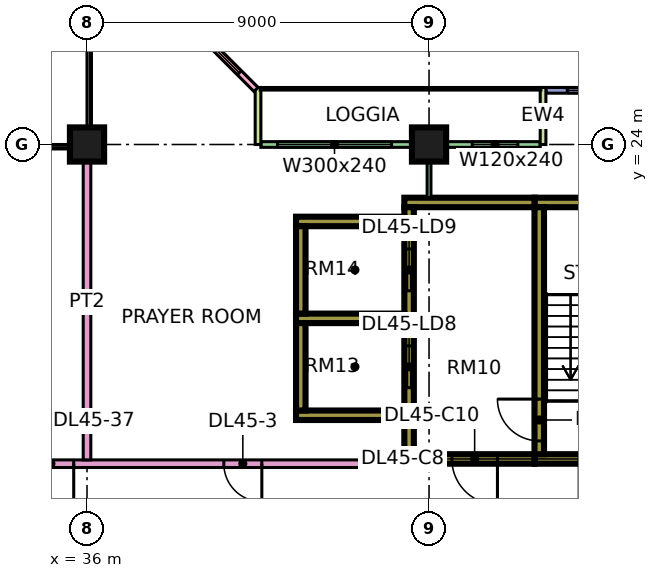
"""IFC4 building model, lengths in metres.
Left out: names, types, materials, properties, quantities, classifications, styles, units other than length and angle.
Written with IfcOpenShell. Run it as: python <this file> out.ifc"""

import sys

from ifc_helpers import new_model, si_unit, direction, frame, frame_2d, origin, origin_2d, place, context, subcontext, project, spatial, rectangle, extrude, element, fill, save


model = new_model("IFC4")
c1 = context("Model", 3, precision=1e-05, world=origin(), true_north=direction((0.0, 1.0)))
c2 = subcontext(c1, "Body", "Model", "MODEL_VIEW")
j1 = project(units=[si_unit("LENGTHUNIT", "METRE"), si_unit("PLANEANGLEUNIT", "RADIAN")], contexts=[c1])
p1 = place(None, origin())
s1 = spatial("IfcSite", under=j1, at=p1, CompositionType="ELEMENT")
p2 = place(p1, origin())
s2 = spatial("IfcBuilding", under=s1, at=p2, CompositionType="ELEMENT")
p3 = place(p2, frame((0.0, 0.0, 194.9)))
s3 = spatial("IfcBuildingStorey", under=s2, at=p3, CompositionType="ELEMENT", Elevation=194.9)
for number, where, z_axis, x_axis in (
    (1, (36.0, 24.0, 0.0), (0.0, 0.0, 1.0), (1.0, 0.0, 0.0)),
    (2, (45.0, 24.0, 0.0), (0.0, 0.0, 1.0), (1.0, 0.0, 0.0)),
):
    element("IfcColumn", number, at=place(p3, frame(where, z_axis=z_axis, x_axis=x_axis)), inside=s3, PredefinedType="COLUMN", context=c2, shape_type="SweptSolid", body=[
        extrude(rectangle(XDim=0.9, YDim=0.9, at=origin_2d()), origin(), (0.0, 0.0, 1.0), 3.75),
    ])
p4 = place(p3, frame((47.775, 15.725, 0.0), z_axis=(0.0, 0.0, 1.0), x_axis=(1.0, 0.0, 0.0)))
e3 = element("IfcWall", 3, at=p4, inside=s3, PredefinedType="SHEAR", context=c2, shape_type="SweptSolid", body=[
    extrude(rectangle(XDim=3.45, YDim=0.25, at=frame_2d((1.725, 0.0))), origin(), (0.0, 0.0, 1.0), 3.75),
])
p5 = place(p4, frame((1.175, 0.0, 0.0)))
e4 = element("IfcOpeningElement", 4, at=p5, cuts=e3, PredefinedType="OPENING", context=c2, shape_type="SweptSolid", body=[
    extrude(rectangle(XDim=1.1, YDim=2.2, at=frame_2d((0.55, 1.1))), frame((0.0, 0.135, 0.0), z_axis=(0.0, -1.0, 0.0), x_axis=(1.0, 0.0, 0.0)), (0.0, 0.0, 1.0), 0.27),
])
p6 = place(p3, frame((47.775, 22.475, 0.0), z_axis=(0.0, 0.0, 1.0), x_axis=(1.0, 0.0, 0.0)))
e5 = element("IfcWall", 5, at=p6, inside=s3, PredefinedType="SHEAR", context=c2, shape_type="SweptSolid", body=[
    extrude(rectangle(XDim=3.45, YDim=0.25, at=frame_2d((1.725, 0.0))), origin(), (0.0, 0.0, 1.0), 3.75),
])
p7 = place(p3, frame((47.9, 15.85, 0.0), z_axis=(0.0, 0.0, 1.0), x_axis=(0.0, 1.0, 0.0)))
e6 = element("IfcWall", 6, at=p7, inside=s3, PredefinedType="SHEAR", context=c2, shape_type="SweptSolid", body=[
    extrude(rectangle(XDim=6.5, YDim=0.25, at=frame_2d((3.25, 0.0))), origin(), (0.0, 0.0, 1.0), 3.75),
])
p8 = place(p7, frame((0.35, 0.0, 0.0)))
e7 = element("IfcOpeningElement", 7, at=p8, cuts=e6, PredefinedType="OPENING", context=c2, shape_type="SweptSolid", body=[
    extrude(rectangle(XDim=1.1, YDim=2.2, at=frame_2d((0.55, 1.1))), frame((0.0, 0.135, 0.0), z_axis=(0.0, -1.0, 0.0), x_axis=(1.0, 0.0, 0.0)), (0.0, 0.0, 1.0), 0.27),
])
p9 = place(p3, frame((44.35, 15.725, 0.0), z_axis=(0.0, 0.0, 1.0), x_axis=(1.0, 0.0, 0.0)))
e8 = element("IfcWall", 8, at=p9, inside=s3, PredefinedType="SHEAR", context=c2, shape_type="SweptSolid", body=[
    extrude(rectangle(XDim=3.425, YDim=0.25, at=frame_2d((1.712, 0.0))), origin(), (0.0, 0.0, 1.0), 3.75),
])
p10 = place(p9, frame((1.25, 0.0, 0.0)))
e9 = element("IfcOpeningElement", 9, at=p10, cuts=e8, PredefinedType="OPENING", context=c2, shape_type="SweptSolid", body=[
    extrude(rectangle(XDim=1.2, YDim=2.2, at=frame_2d((0.6, 1.1))), frame((0.0, 0.135, 0.0), z_axis=(0.0, -1.0, 0.0), x_axis=(1.0, 0.0, 0.0)), (0.0, 0.0, 1.0), 0.27),
])
p11 = place(p3, frame((44.35, 22.475, 0.0), z_axis=(0.0, 0.0, 1.0), x_axis=(1.0, 0.0, 0.0)))
e10 = element("IfcWall", 10, at=p11, inside=s3, PredefinedType="SHEAR", context=c2, shape_type="SweptSolid", body=[
    extrude(rectangle(XDim=3.425, YDim=0.25, at=frame_2d((1.712, 0.0))), origin(), (0.0, 0.0, 1.0), 3.75),
])
p12 = place(p3, frame((44.475, 15.85, 0.0), z_axis=(0.0, 0.0, 1.0), x_axis=(0.0, 1.0, 0.0)))
e11 = element("IfcWall", 11, at=p12, inside=s3, PredefinedType="SHEAR", context=c2, shape_type="SweptSolid", body=[
    extrude(rectangle(XDim=6.5, YDim=0.25, at=frame_2d((3.25, 0.0))), origin(), (0.0, 0.0, 1.0), 3.75),
])
p13 = place(p12, frame((1.75, 0.0, 0.0)))
e12 = element("IfcOpeningElement", 12, at=p13, cuts=e11, PredefinedType="OPENING", context=c2, shape_type="SweptSolid", body=[
    extrude(rectangle(XDim=1.1, YDim=2.2, at=frame_2d((0.55, 1.1))), frame((0.0, 0.135, 0.0), z_axis=(0.0, -1.0, 0.0), x_axis=(1.0, 0.0, 0.0)), (0.0, 0.0, 1.0), 0.27),
])
p14 = place(p12, frame((4.3, 0.0, 0.0)))
e13 = element("IfcOpeningElement", 13, at=p14, cuts=e11, PredefinedType="OPENING", context=c2, shape_type="SweptSolid", body=[
    extrude(rectangle(XDim=1.1, YDim=2.2, at=frame_2d((0.55, 1.1))), frame((0.0, 0.135, 0.0), z_axis=(0.0, -1.0, 0.0), x_axis=(1.0, 0.0, 0.0)), (0.0, 0.0, 1.0), 0.27),
])
for number, where, z_axis, x_axis in (
    (14, (41.5, 16.875, 0.0), (0.0, 0.0, 1.0), (1.0, 0.0, 0.0)),
    (15, (41.5, 19.425, 0.0), (0.0, 0.0, 1.0), (1.0, 0.0, 0.0)),
    (16, (41.5, 21.975, 0.0), (0.0, 0.0, 1.0), (1.0, 0.0, 0.0)),
):
    element("IfcWall", number, at=place(p3, frame(where, z_axis=z_axis, x_axis=x_axis)), inside=s3, PredefinedType="SHEAR", context=c2, shape_type="SweptSolid", body=[
        extrude(rectangle(XDim=2.85, YDim=0.25, at=frame_2d((1.425, 0.0))), origin(), (0.0, 0.0, 1.0), 3.75),
    ])
for number, where, z_axis, x_axis in (
    (17, (41.625, 17.0, 0.0), (0.0, 0.0, 1.0), (0.0, 1.0, 0.0)),
    (18, (41.625, 19.55, 0.0), (0.0, 0.0, 1.0), (0.0, 1.0, 0.0)),
):
    element("IfcWall", number, at=place(p3, frame(where, z_axis=z_axis, x_axis=x_axis)), inside=s3, PredefinedType="SHEAR", context=c2, shape_type="SweptSolid", body=[
        extrude(rectangle(XDim=2.3, YDim=0.25, at=frame_2d((1.15, 0.0))), origin(), (0.0, 0.0, 1.0), 3.75),
    ])
p15 = place(p3, frame((61.5, 25.425, 0.0), z_axis=(0.0, 0.0, 1.0), x_axis=(-1.0, 0.0, 0.0)))
e19 = element("IfcWall", 19, at=p15, inside=s3, PredefinedType="SOLIDWALL", context=c2, shape_type="SweptSolid", body=[
    extrude(rectangle(XDim=13.425, YDim=0.15, at=frame_2d((6.712, 0.0))), origin(), (0.0, 0.0, 1.0), 3.35),
])
p16 = place(p15, frame((0.3, 0.0, 0.45)))
e20 = element("IfcOpeningElement", 20, at=p16, cuts=e19, PredefinedType="OPENING", context=c2, shape_type="SweptSolid", body=[
    extrude(rectangle(XDim=0.9, YDim=2.4, at=frame_2d((0.45, 1.2))), frame((0.0, 0.085, 0.0), z_axis=(0.0, -1.0, 0.0), x_axis=(1.0, 0.0, 0.0)), (0.0, 0.0, 1.0), 0.17),
])
p17 = place(p15, frame((3.0, 0.0, 0.45)))
e21 = element("IfcOpeningElement", 21, at=p17, cuts=e19, PredefinedType="OPENING", context=c2, shape_type="SweptSolid", body=[
    extrude(rectangle(XDim=3.0, YDim=2.4, at=frame_2d((1.5, 1.2))), frame((0.0, 0.085, 0.0), z_axis=(0.0, -1.0, 0.0), x_axis=(1.0, 0.0, 0.0)), (0.0, 0.0, 1.0), 0.17),
])
p18 = place(p15, frame((8.062, 0.0, 0.45)))
e22 = element("IfcOpeningElement", 22, at=p18, cuts=e19, PredefinedType="OPENING", context=c2, shape_type="SweptSolid", body=[
    extrude(rectangle(XDim=4.8, YDim=2.4, at=frame_2d((2.4, 1.2))), frame((0.0, 0.085, 0.0), z_axis=(0.0, -1.0, 0.0), x_axis=(1.0, 0.0, 0.0)), (0.0, 0.0, 1.0), 0.17),
])
p19 = place(p3, frame((47.925, 24.0, 0.0), z_axis=(0.0, 0.0, 1.0), x_axis=(-1.0, 0.0, 0.0)))
e23 = element("IfcWall", 23, at=p19, inside=s3, PredefinedType="SOLIDWALL", context=c2, shape_type="SweptSolid", body=[
    extrude(rectangle(XDim=7.35, YDim=0.15, at=frame_2d((3.675, 0.0))), origin(), (0.0, 0.0, 1.0), 3.35),
])
p20 = place(p19, frame((0.587, 0.0, 0.45)))
e24 = element("IfcOpeningElement", 24, at=p20, cuts=e23, PredefinedType="OPENING", context=c2, shape_type="SweptSolid", body=[
    extrude(rectangle(XDim=1.2, YDim=2.4, at=frame_2d((0.6, 1.2))), frame((0.0, 0.085, 0.0), z_axis=(0.0, -1.0, 0.0), x_axis=(1.0, 0.0, 0.0)), (0.0, 0.0, 1.0), 0.17),
])
p21 = place(p19, frame((3.913, 0.0, 0.45)))
e25 = element("IfcOpeningElement", 25, at=p21, cuts=e23, PredefinedType="OPENING", context=c2, shape_type="SweptSolid", body=[
    extrude(rectangle(XDim=3.0, YDim=2.4, at=frame_2d((1.5, 1.2))), frame((0.0, 0.085, 0.0), z_axis=(0.0, -1.0, 0.0), x_axis=(1.0, 0.0, 0.0)), (0.0, 0.0, 1.0), 0.17),
])
for number, where, z_axis, x_axis in (
    (26, (48.0, 25.5, 0.0), (0.0, 0.0, 1.0), (0.0, -1.0, 0.0)),
    (27, (40.5, 25.5, 0.0), (0.0, 0.0, 1.0), (0.0, -1.0, 0.0)),
):
    element("IfcWall", number, at=place(p3, frame(where, z_axis=z_axis, x_axis=x_axis)), inside=s3, PredefinedType="SOLIDWALL", context=c2, shape_type="SweptSolid", body=[
        extrude(rectangle(XDim=1.5, YDim=0.15, at=frame_2d((0.75, 0.0))), origin(), (0.0, 0.0, 1.0), 3.35),
    ])
p22 = place(p3, frame((40.447, 25.447, 0.0), z_axis=(0.0, 0.0, 1.0), x_axis=(-0.707106781187, 0.707106781187, 0.0)))
e28 = element("IfcWall", 28, at=p22, inside=s3, PredefinedType="SOLIDWALL", context=c2, shape_type="SweptSolid", body=[
    extrude(rectangle(XDim=4.243, YDim=0.15, at=frame_2d((2.121, 0.0))), origin(), (0.0, 0.0, 1.0), 3.35),
])
p23 = place(p22, frame((0.621, 0.0, 0.45)))
e29 = element("IfcOpeningElement", 29, at=p23, cuts=e28, PredefinedType="OPENING", context=c2, shape_type="SweptSolid", body=[
    extrude(rectangle(XDim=3.0, YDim=2.4, at=frame_2d((1.5, 1.2))), frame((0.0, 0.085, 0.0), z_axis=(0.0, -1.0, 0.0), x_axis=(1.0, 0.0, 0.0)), (0.0, 0.0, 1.0), 0.17),
])
p24 = place(p3, frame((34.0, 15.6, 0.0), z_axis=(0.0, 0.0, 1.0), x_axis=(1.0, 0.0, 0.0)))
e30 = element("IfcWall", 30, at=p24, inside=s3, PredefinedType="PARTITIONING", context=c2, shape_type="SweptSolid", body=[
    extrude(rectangle(XDim=10.35, YDim=0.2, at=frame_2d((5.175, 0.0))), origin(), (0.0, 0.0, 1.0), 3.35),
])
p25 = place(p24, frame((5.6, 0.0, 0.0)))
e31 = element("IfcOpeningElement", 31, at=p25, cuts=e30, PredefinedType="OPENING", context=c2, shape_type="SweptSolid", body=[
    extrude(rectangle(XDim=1.0, YDim=2.1, at=frame_2d((0.5, 1.05))), frame((0.0, 0.11, 0.0), z_axis=(0.0, -1.0, 0.0), x_axis=(1.0, 0.0, 0.0)), (0.0, 0.0, 1.0), 0.22),
])
p26 = place(p24, frame((0.45, 0.0, 0.0)))
e32 = element("IfcOpeningElement", 32, at=p26, cuts=e30, PredefinedType="OPENING", context=c2, shape_type="SweptSolid", body=[
    extrude(rectangle(XDim=1.2, YDim=2.1, at=frame_2d((0.6, 1.05))), frame((0.0, 0.11, 0.0), z_axis=(0.0, -1.0, 0.0), x_axis=(1.0, 0.0, 0.0)), (0.0, 0.0, 1.0), 0.22),
])
p27 = place(p3, frame((36.0, 15.7, 0.0), z_axis=(0.0, 0.0, 1.0), x_axis=(0.0, 1.0, 0.0)))
e33 = element("IfcWall", 33, at=p27, inside=s3, PredefinedType="PARTITIONING", context=c2, shape_type="SweptSolid", body=[
    extrude(rectangle(XDim=8.3, YDim=0.2, at=frame_2d((4.15, 0.0))), origin(), (0.0, 0.0, 1.0), 3.35),
])
p28 = place(p3, frame((45.0, 22.6, 0.0), z_axis=(0.0, 0.0, 1.0), x_axis=(0.0, 1.0, 0.0)))
e34 = element("IfcWall", 34, at=p28, inside=s3, PredefinedType="PARTITIONING", context=c2, shape_type="SweptSolid", body=[
    extrude(rectangle(XDim=1.326, YDim=0.1, at=frame_2d((0.663, 0.0))), origin(), (0.0, 0.0, 1.0), 3.35),
])
p29 = place(p18, origin())
e35 = element("IfcWindow", 35, at=p29, inside=s3, PartitioningType="SINGLE_PANEL", PredefinedType="WINDOW", context=c2, shape_type="SweptSolid", body=[
    extrude(rectangle(XDim=4.8, YDim=2.4, at=frame_2d((2.4, 1.2))), frame((0.0, 0.03, 0.0), z_axis=(0.0, -1.0, 0.0), x_axis=(1.0, 0.0, 0.0)), (0.0, 0.0, 1.0), 0.06),
])
fill(e22, e35)
p30 = place(p20, origin())
e36 = element("IfcWindow", 36, at=p30, inside=s3, PartitioningType="SINGLE_PANEL", PredefinedType="WINDOW", context=c2, shape_type="SweptSolid", body=[
    extrude(rectangle(XDim=1.2, YDim=2.4, at=frame_2d((0.6, 1.2))), frame((0.0, 0.03, 0.0), z_axis=(0.0, -1.0, 0.0), x_axis=(1.0, 0.0, 0.0)), (0.0, 0.0, 1.0), 0.06),
])
fill(e24, e36)
p31 = place(p21, origin())
e37 = element("IfcWindow", 37, at=p31, inside=s3, PartitioningType="SINGLE_PANEL", PredefinedType="WINDOW", context=c2, shape_type="SweptSolid", body=[
    extrude(rectangle(XDim=3.0, YDim=2.4, at=frame_2d((1.5, 1.2))), frame((0.0, 0.03, 0.0), z_axis=(0.0, -1.0, 0.0), x_axis=(1.0, 0.0, 0.0)), (0.0, 0.0, 1.0), 0.06),
])
fill(e25, e37)
p32 = place(p23, origin())
e38 = element("IfcWindow", 38, at=p32, inside=s3, PartitioningType="SINGLE_PANEL", PredefinedType="WINDOW", context=c2, shape_type="SweptSolid", body=[
    extrude(rectangle(XDim=3.0, YDim=2.4, at=frame_2d((1.5, 1.2))), frame((0.0, 0.03, 0.0), z_axis=(0.0, -1.0, 0.0), x_axis=(1.0, 0.0, 0.0)), (0.0, 0.0, 1.0), 0.06),
])
fill(e29, e38)
p33 = place(p10, origin())
e39 = element("IfcDoor", 39, at=p33, inside=s3, OperationType="SINGLE_SWING_RIGHT", PredefinedType="DOOR", context=c2, shape_type="SweptSolid", body=[
    extrude(rectangle(XDim=1.2, YDim=2.2, at=frame_2d((0.6, 1.1))), frame((0.0, 0.025, 0.0), z_axis=(0.0, -1.0, 0.0), x_axis=(1.0, 0.0, 0.0)), (0.0, 0.0, 1.0), 0.05),
])
fill(e9, e39)
p34 = place(p8, frame((1.1, 0.0, 0.0), z_axis=(0.0, 0.0, 1.0), x_axis=(-1.0, 0.0, 0.0)))
e40 = element("IfcDoor", 40, at=p34, inside=s3, OperationType="SINGLE_SWING_RIGHT", PredefinedType="DOOR", context=c2, shape_type="SweptSolid", body=[
    extrude(rectangle(XDim=1.1, YDim=2.2, at=frame_2d((0.55, 1.1))), frame((0.0, 0.025, 0.0), z_axis=(0.0, -1.0, 0.0), x_axis=(1.0, 0.0, 0.0)), (0.0, 0.0, 1.0), 0.05),
])
fill(e7, e40)
p35 = place(p13, origin())
e41 = element("IfcDoor", 41, at=p35, inside=s3, OperationType="DOUBLE_DOOR_SLIDING", PredefinedType="DOOR", context=c2, shape_type="SweptSolid", body=[
    extrude(rectangle(XDim=1.1, YDim=2.2, at=frame_2d((0.55, 1.1))), frame((0.0, 0.025, 0.0), z_axis=(0.0, -1.0, 0.0), x_axis=(1.0, 0.0, 0.0)), (0.0, 0.0, 1.0), 0.05),
])
fill(e12, e41)
p36 = place(p14, origin())
e42 = element("IfcDoor", 42, at=p36, inside=s3, OperationType="DOUBLE_DOOR_SLIDING", PredefinedType="DOOR", context=c2, shape_type="SweptSolid", body=[
    extrude(rectangle(XDim=1.1, YDim=2.2, at=frame_2d((0.55, 1.1))), frame((0.0, 0.025, 0.0), z_axis=(0.0, -1.0, 0.0), x_axis=(1.0, 0.0, 0.0)), (0.0, 0.0, 1.0), 0.05),
])
fill(e13, e42)
p37 = place(p25, origin())
e43 = element("IfcDoor", 43, at=p37, inside=s3, OperationType="SINGLE_SWING_RIGHT", PredefinedType="DOOR", context=c2, shape_type="SweptSolid", body=[
    extrude(rectangle(XDim=1.0, YDim=2.1, at=frame_2d((0.5, 1.05))), frame((0.0, 0.025, 0.0), z_axis=(0.0, -1.0, 0.0), x_axis=(1.0, 0.0, 0.0)), (0.0, 0.0, 1.0), 0.05),
])
fill(e31, e43)
p38 = place(p26, origin())
e44 = element("IfcDoor", 44, at=p38, inside=s3, OperationType="SINGLE_SWING_RIGHT", PredefinedType="DOOR", context=c2, shape_type="SweptSolid", body=[
    extrude(rectangle(XDim=1.2, YDim=2.1, at=frame_2d((0.6, 1.05))), frame((0.0, 0.025, 0.0), z_axis=(0.0, -1.0, 0.0), x_axis=(1.0, 0.0, 0.0)), (0.0, 0.0, 1.0), 0.05),
])
fill(e32, e44)
save(model, sys.argv[1])
